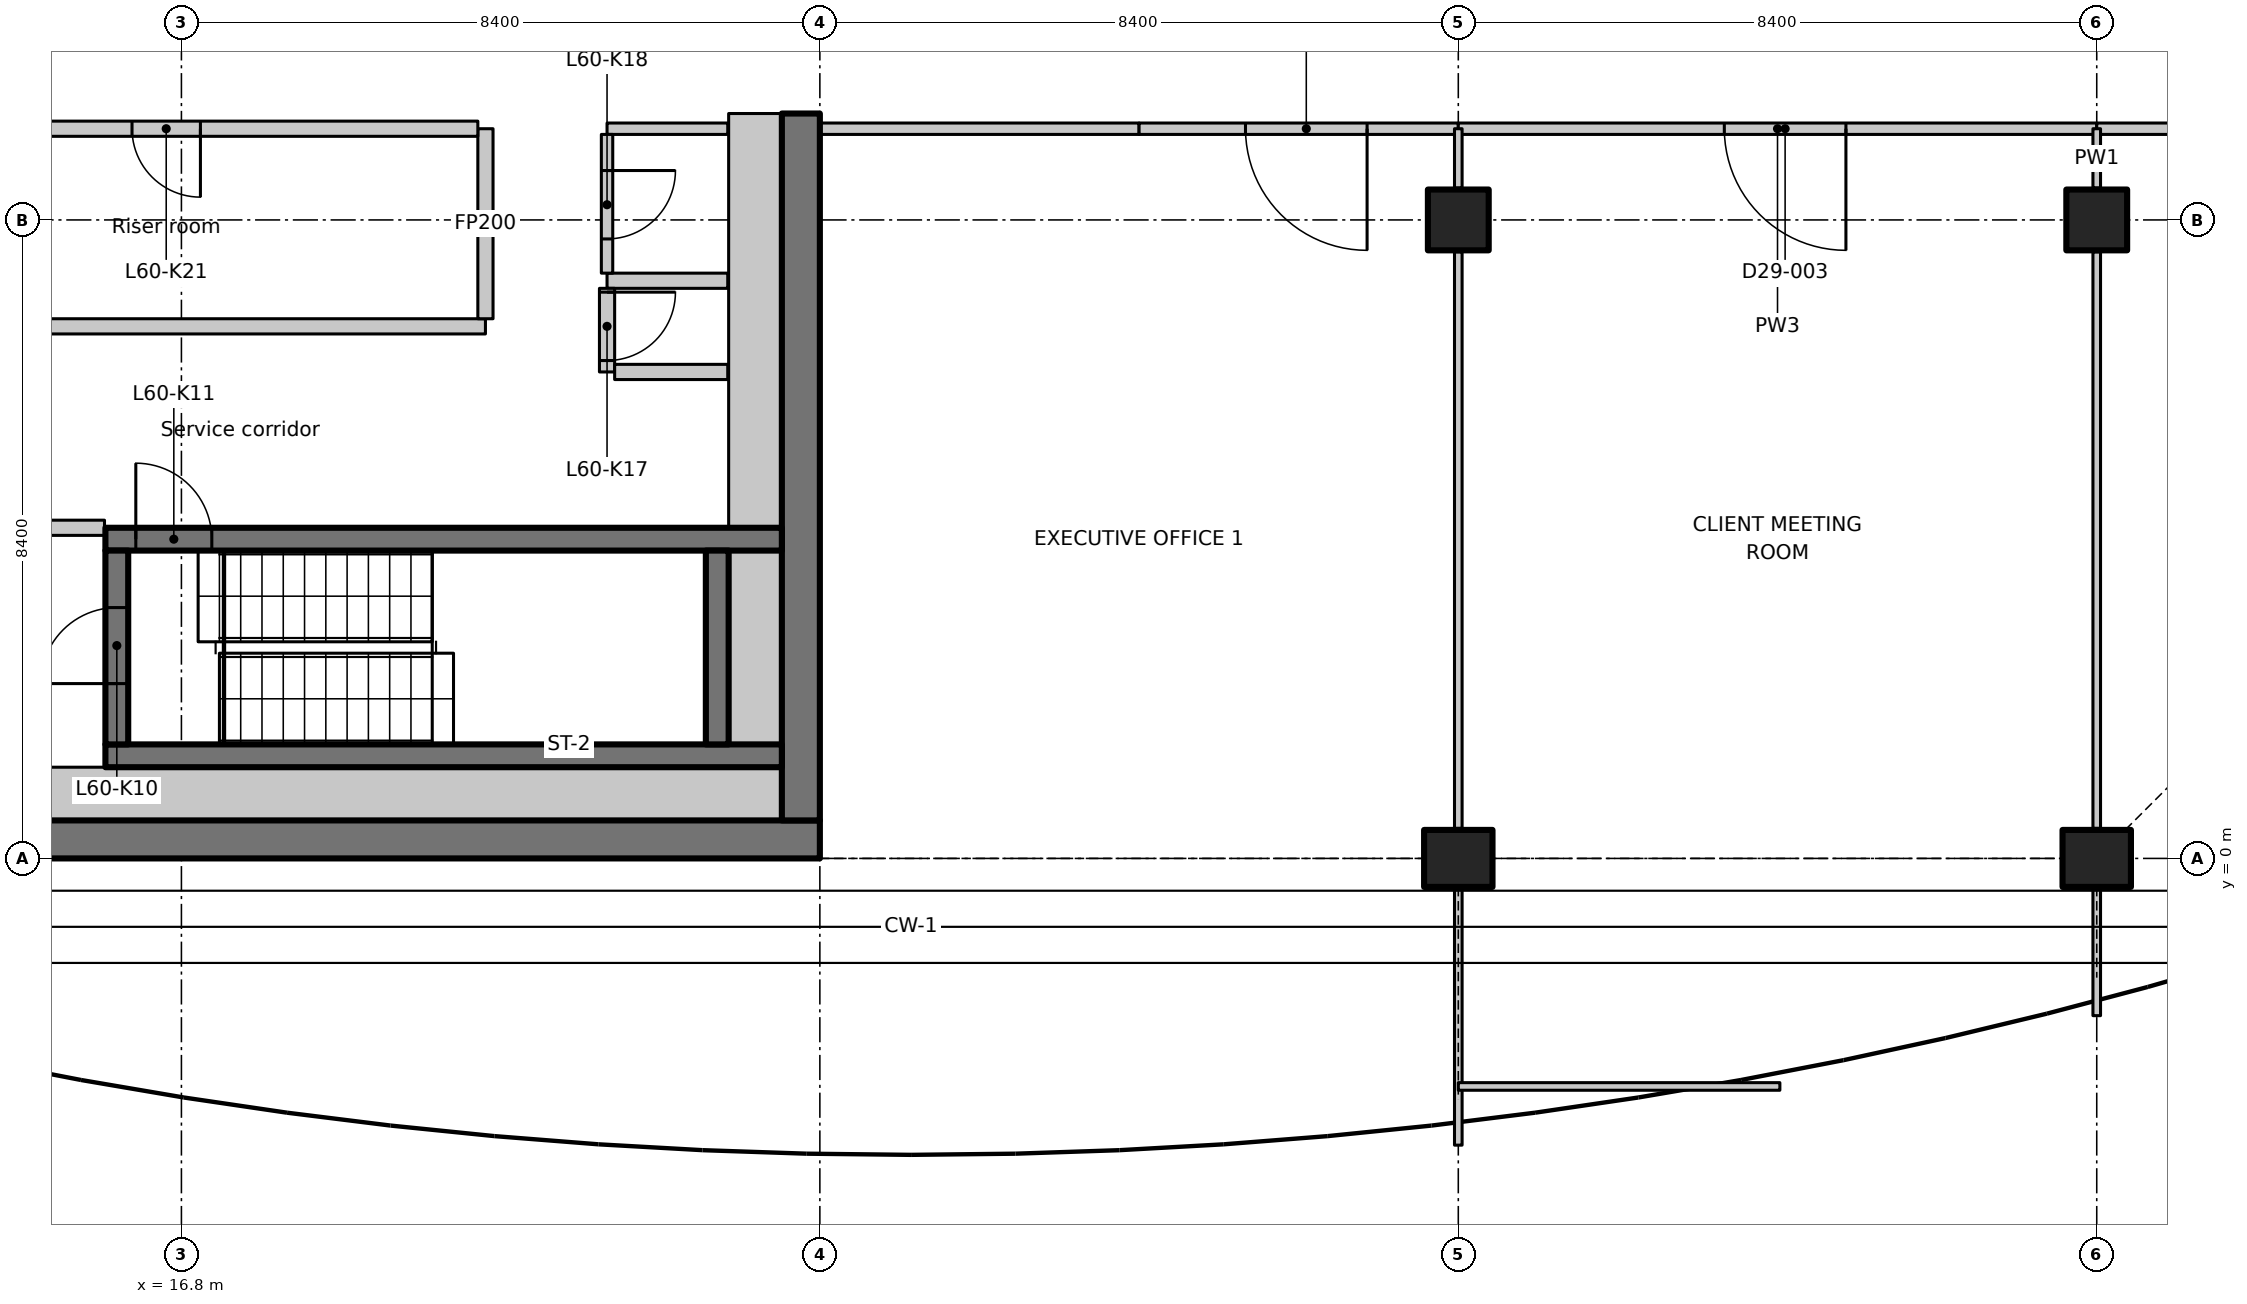
"""IFC4 building model, lengths in metres.
Left out: names, types, materials, properties, quantities, classifications, styles, units other than length and angle.
Written with IfcOpenShell. Run it as: python <this file> out.ifc"""

import sys

from ifc_helpers import new_model, si_unit, direction, frame, frame_2d, origin, origin_2d, place, context, subcontext, project, spatial, polyline, rectangle, outline, extrude, element, fill, save


model = new_model("IFC4")
c1 = context("Model", 3, precision=1e-05, world=origin(), true_north=direction((0.0, 1.0)))
c2 = subcontext(c1, "Body", "Model", "MODEL_VIEW")
j1 = project(units=[si_unit("LENGTHUNIT", "METRE"), si_unit("PLANEANGLEUNIT", "RADIAN")], contexts=[c1])
p1 = place(None, origin())
s1 = spatial("IfcSite", under=j1, at=p1, CompositionType="ELEMENT")
p2 = place(p1, origin())
s2 = spatial("IfcBuilding", under=s1, at=p2, CompositionType="ELEMENT")
p3 = place(p2, frame((0.0, 0.0, 237.3)))
s3 = spatial("IfcBuildingStorey", under=s2, at=p3, CompositionType="ELEMENT", Elevation=237.3)
p4 = place(p3, frame((33.6, 0.0, 0.0), z_axis=(0.0, 0.0, 1.0), x_axis=(0.0, 1.0, 0.0)))
e1 = element("IfcColumn", 1, at=p4, inside=s3, PredefinedType="COLUMN", context=c2, shape_type="SweptSolid", body=[
    extrude(rectangle(XDim=0.75, YDim=0.9, at=origin_2d()), origin(), (0.0, 0.0, 1.0), 3.35),
])
p5 = place(p3, frame((33.6, 8.4, 0.0), z_axis=(0.0, 0.0, 1.0), x_axis=(1.0, 0.0, 0.0)))
e2 = element("IfcColumn", 2, at=p5, inside=s3, PredefinedType="COLUMN", context=c2, shape_type="SweptSolid", body=[
    extrude(rectangle(XDim=0.8, YDim=0.8, at=origin_2d()), origin(), (0.0, 0.0, 1.0), 3.35),
])
p6 = place(p3, frame((42.0, 0.0, 0.0), z_axis=(0.0, 0.0, 1.0), x_axis=(0.0, 1.0, 0.0)))
e3 = element("IfcColumn", 3, at=p6, inside=s3, PredefinedType="COLUMN", context=c2, shape_type="SweptSolid", body=[
    extrude(rectangle(XDim=0.75, YDim=0.9, at=origin_2d()), origin(), (0.0, 0.0, 1.0), 3.35),
])
p7 = place(p3, frame((42.0, 8.4, 0.0), z_axis=(0.0, 0.0, 1.0), x_axis=(1.0, 0.0, 0.0)))
e4 = element("IfcColumn", 4, at=p7, inside=s3, PredefinedType="COLUMN", context=c2, shape_type="SweptSolid", body=[
    extrude(rectangle(XDim=0.8, YDim=0.8, at=origin_2d()), origin(), (0.0, 0.0, 1.0), 3.35),
])
p8 = place(p3, frame((7.436, 0.25, 0.0), z_axis=(0.0, 0.0, 1.0), x_axis=(1.0, 0.0, 0.0)))
e5 = element("IfcWall", 5, at=p8, inside=s3, PredefinedType="SHEAR", context=c2, shape_type="SweptSolid", body=[
    extrude(rectangle(XDim=17.764, YDim=0.5, at=frame_2d((8.882, 0.0))), origin(), (0.0, 0.0, 1.0), 3.35),
])
p9 = place(p3, frame((24.95, 0.5, 0.0), z_axis=(0.0, 0.0, 1.0), x_axis=(0.0, 1.0, 0.0)))
e6 = element("IfcWall", 6, at=p9, inside=s3, PredefinedType="SHEAR", context=c2, shape_type="SweptSolid", body=[
    extrude(rectangle(XDim=9.3, YDim=0.5, at=frame_2d((4.65, 0.0))), origin(), (0.0, 0.0, 1.0), 3.35),
])
p10 = place(p3, frame((15.8, 1.35, 0.0), z_axis=(0.0, 0.0, 1.0), x_axis=(1.0, 0.0, 0.0)))
e7 = element("IfcWall", 7, at=p10, inside=s3, PredefinedType="SHEAR", context=c2, shape_type="SweptSolid", body=[
    extrude(rectangle(XDim=8.9, YDim=0.3, at=frame_2d((4.45, 0.0))), origin(), (0.0, 0.0, 1.0), 3.35),
])
p11 = place(p3, frame((15.8, 4.2, 0.0), z_axis=(0.0, 0.0, 1.0), x_axis=(1.0, 0.0, 0.0)))
e8 = element("IfcWall", 8, at=p11, inside=s3, PredefinedType="SHEAR", context=c2, shape_type="SweptSolid", body=[
    extrude(rectangle(XDim=8.9, YDim=0.3, at=frame_2d((4.45, 0.0))), origin(), (0.0, 0.0, 1.0), 3.35),
])
p12 = place(p11, frame((0.4, 0.0, 0.0)))
e9 = element("IfcOpeningElement", 9, at=p12, cuts=e8, PredefinedType="OPENING", context=c2, shape_type="SweptSolid", body=[
    extrude(rectangle(XDim=1.0, YDim=2.1, at=frame_2d((0.5, 1.05))), frame((0.0, 0.16, 0.0), z_axis=(0.0, -1.0, 0.0), x_axis=(1.0, 0.0, 0.0)), (0.0, 0.0, 1.0), 0.32),
])
p13 = place(p3, frame((15.95, 1.5, 0.0), z_axis=(0.0, 0.0, 1.0), x_axis=(0.0, 1.0, 0.0)))
e10 = element("IfcWall", 10, at=p13, inside=s3, PredefinedType="SHEAR", context=c2, shape_type="SweptSolid", body=[
    extrude(rectangle(XDim=2.55, YDim=0.3, at=frame_2d((1.275, 0.0))), origin(), (0.0, 0.0, 1.0), 3.35),
])
p14 = place(p13, frame((0.8, 0.0, 0.0)))
e11 = element("IfcOpeningElement", 11, at=p14, cuts=e10, PredefinedType="OPENING", context=c2, shape_type="SweptSolid", body=[
    extrude(rectangle(XDim=1.0, YDim=2.1, at=frame_2d((0.5, 1.05))), frame((0.0, 0.16, 0.0), z_axis=(0.0, -1.0, 0.0), x_axis=(1.0, 0.0, 0.0)), (0.0, 0.0, 1.0), 0.32),
])
p15 = place(p3, frame((23.85, 1.5, 0.0), z_axis=(0.0, 0.0, 1.0), x_axis=(0.0, 1.0, 0.0)))
e12 = element("IfcWall", 12, at=p15, inside=s3, PredefinedType="SHEAR", context=c2, shape_type="SweptSolid", body=[
    extrude(rectangle(XDim=2.55, YDim=0.3, at=frame_2d((1.275, 0.0))), origin(), (0.0, 0.0, 1.0), 3.35),
])
p16 = place(p3, frame((13.362, 4.35, 0.0), z_axis=(0.0, 0.0, 1.0), x_axis=(1.0, 0.0, 0.0)))
e13 = element("IfcWall", 13, at=p16, inside=s3, PredefinedType="PARTITIONING", context=c2, shape_type="SweptSolid", body=[
    extrude(rectangle(XDim=2.426, YDim=0.2, at=frame_2d((1.213, 0.0))), origin(), (0.0, 0.0, 1.0), 3.35),
])
p17 = place(p16, frame((0.638, 0.0, 0.0)))
e14 = element("IfcOpeningElement", 14, at=p17, cuts=e13, PredefinedType="OPENING", context=c2, shape_type="SweptSolid", body=[
    extrude(rectangle(XDim=1.0, YDim=2.1, at=frame_2d((0.5, 1.05))), frame((0.0, 0.11, 0.0), z_axis=(0.0, -1.0, 0.0), x_axis=(1.0, 0.0, 0.0)), (0.0, 0.0, 1.0), 0.22),
])
p18 = place(p3, frame((12.4, 7.0, 0.0), z_axis=(0.0, 0.0, 1.0), x_axis=(1.0, 0.0, 0.0)))
e15 = element("IfcWall", 15, at=p18, inside=s3, PredefinedType="PARTITIONING", context=c2, shape_type="SweptSolid", body=[
    extrude(rectangle(XDim=8.4, YDim=0.2, at=frame_2d((4.2, 0.0))), origin(), (0.0, 0.0, 1.0), 3.35),
])
p19 = place(p3, frame((20.8, 7.1, 0.0), z_axis=(0.0, 0.0, 1.0), x_axis=(0.0, 1.0, 0.0)))
e16 = element("IfcWall", 16, at=p19, inside=s3, PredefinedType="PARTITIONING", context=c2, shape_type="SweptSolid", body=[
    extrude(rectangle(XDim=2.5, YDim=0.2, at=frame_2d((1.25, 0.0))), origin(), (0.0, 0.0, 1.0), 3.35),
])
p20 = place(p3, frame((20.7, 9.6, 0.0), z_axis=(0.0, 0.0, 1.0), x_axis=(-1.0, 0.0, 0.0)))
e17 = element("IfcWall", 17, at=p20, inside=s3, PredefinedType="PARTITIONING", context=c2, shape_type="SweptSolid", body=[
    extrude(rectangle(XDim=8.3, YDim=0.2, at=frame_2d((4.15, 0.0))), origin(), (0.0, 0.0, 1.0), 3.35),
])
p21 = place(p20, frame((3.65, 0.0, 0.0)))
e18 = element("IfcOpeningElement", 18, at=p21, cuts=e17, PredefinedType="OPENING", context=c2, shape_type="SweptSolid", body=[
    extrude(rectangle(XDim=0.9, YDim=2.1, at=frame_2d((0.45, 1.05))), frame((0.0, 0.11, 0.0), z_axis=(0.0, -1.0, 0.0), x_axis=(1.0, 0.0, 0.0)), (0.0, 0.0, 1.0), 0.22),
])
p22 = place(p3, frame((23.988, 7.6, 0.0), z_axis=(0.0, 0.0, 1.0), x_axis=(-1.0, 0.0, 0.0)))
e19 = element("IfcWall", 19, at=p22, inside=s3, PredefinedType="PARTITIONING", context=c2, shape_type="SweptSolid", body=[
    extrude(rectangle(XDim=1.588, YDim=0.2, at=frame_2d((0.794, 0.0))), origin(), (0.0, 0.0, 1.0), 3.35),
])
p23 = place(p3, frame((22.4, 7.5, 0.0), z_axis=(0.0, 0.0, 1.0), x_axis=(0.0, -1.0, 0.0)))
e20 = element("IfcWall", 20, at=p23, inside=s3, PredefinedType="PARTITIONING", context=c2, shape_type="SweptSolid", body=[
    extrude(rectangle(XDim=1.1, YDim=0.2, at=frame_2d((0.55, 0.0))), origin(), (0.0, 0.0, 1.0), 3.35),
])
p24 = place(p23, frame((0.05, 0.0, 0.0)))
e21 = element("IfcOpeningElement", 21, at=p24, cuts=e20, PredefinedType="OPENING", context=c2, shape_type="SweptSolid", body=[
    extrude(rectangle(XDim=0.9, YDim=2.1, at=frame_2d((0.45, 1.05))), frame((0.0, 0.11, 0.0), z_axis=(0.0, -1.0, 0.0), x_axis=(1.0, 0.0, 0.0)), (0.0, 0.0, 1.0), 0.22),
])
p25 = place(p3, frame((22.5, 6.4, 0.0), z_axis=(0.0, 0.0, 1.0), x_axis=(1.0, 0.0, 0.0)))
e22 = element("IfcWall", 22, at=p25, inside=s3, PredefinedType="PARTITIONING", context=c2, shape_type="SweptSolid", body=[
    extrude(rectangle(XDim=1.488, YDim=0.2, at=frame_2d((0.744, 0.0))), origin(), (0.0, 0.0, 1.0), 3.35),
])
p26 = place(p3, frame((23.988, 9.6, 0.0), z_axis=(0.0, 0.0, 1.0), x_axis=(-1.0, 0.0, 0.0)))
e23 = element("IfcWall", 23, at=p26, inside=s3, PredefinedType="PARTITIONING", context=c2, shape_type="SweptSolid", body=[
    extrude(rectangle(XDim=1.588, YDim=0.15, at=frame_2d((0.794, 0.0))), origin(), (0.0, 0.0, 1.0), 3.35),
])
p27 = place(p3, frame((22.4, 9.525, 0.0), z_axis=(0.0, 0.0, 1.0), x_axis=(0.0, -1.0, 0.0)))
e24 = element("IfcWall", 24, at=p27, inside=s3, PredefinedType="PARTITIONING", context=c2, shape_type="SweptSolid", body=[
    extrude(rectangle(XDim=1.825, YDim=0.15, at=frame_2d((0.913, 0.0))), origin(), (0.0, 0.0, 1.0), 3.35),
])
p28 = place(p27, frame((0.475, 0.0, 0.0)))
e25 = element("IfcOpeningElement", 25, at=p28, cuts=e24, PredefinedType="OPENING", context=c2, shape_type="SweptSolid", body=[
    extrude(rectangle(XDim=0.9, YDim=2.1, at=frame_2d((0.45, 1.05))), frame((0.0, 0.085, 0.0), z_axis=(0.0, -1.0, 0.0), x_axis=(1.0, 0.0, 0.0)), (0.0, 0.0, 1.0), 0.17),
])
p29 = place(p3, frame((13.35, 0.85, 0.0), z_axis=(0.0, 0.0, 1.0), x_axis=(1.0, 0.0, 0.0)))
e26 = element("IfcWall", 26, at=p29, inside=s3, PredefinedType="PARTITIONING", context=c2, shape_type="SweptSolid", body=[
    extrude(rectangle(XDim=11.35, YDim=0.7, at=frame_2d((5.675, 0.0))), origin(), (0.0, 0.0, 1.0), 3.35),
])
p30 = place(p3, frame((24.35, 1.5, 0.0), z_axis=(0.0, 0.0, 1.0), x_axis=(0.0, 1.0, 0.0)))
e27 = element("IfcWall", 27, at=p30, inside=s3, PredefinedType="PARTITIONING", context=c2, shape_type="SweptSolid", body=[
    extrude(rectangle(XDim=2.55, YDim=0.7, at=frame_2d((1.275, 0.0))), origin(), (0.0, 0.0, 1.0), 3.35),
])
p31 = place(p3, frame((24.35, 4.35, 0.0), z_axis=(0.0, 0.0, 1.0), x_axis=(0.0, 1.0, 0.0)))
e28 = element("IfcWall", 28, at=p31, inside=s3, PredefinedType="PARTITIONING", context=c2, shape_type="SweptSolid", body=[
    extrude(rectangle(XDim=5.45, YDim=0.7, at=frame_2d((2.725, 0.0))), origin(), (0.0, 0.0, 1.0), 3.35),
])
p32 = place(p3, frame((29.4, 9.6, 0.0), z_axis=(0.0, 0.0, 1.0), x_axis=(-1.0, 0.0, 0.0)))
e29 = element("IfcWall", 29, at=p32, inside=s3, PredefinedType="PARTITIONING", context=c2, shape_type="SweptSolid", body=[
    extrude(rectangle(XDim=4.2, YDim=0.15, at=frame_2d((2.1, 0.0))), origin(), (0.0, 0.0, 1.0), 3.33),
])
p33 = place(p3, frame((33.6, 9.6, 0.0), z_axis=(0.0, 0.0, 1.0), x_axis=(-1.0, 0.0, 0.0)))
e30 = element("IfcWall", 30, at=p33, inside=s3, PredefinedType="PARTITIONING", context=c2, shape_type="SweptSolid", body=[
    extrude(rectangle(XDim=4.2, YDim=0.15, at=frame_2d((2.1, 0.0))), origin(), (0.0, 0.0, 1.0), 3.33),
])
p34 = place(p33, frame((1.2, 0.0, 0.0)))
e31 = element("IfcOpeningElement", 31, at=p34, cuts=e30, PredefinedType="OPENING", context=c2, shape_type="SweptSolid", body=[
    extrude(rectangle(XDim=1.6, YDim=2.1, at=frame_2d((0.8, 1.05))), frame((0.0, 0.085, 0.0), z_axis=(0.0, -1.0, 0.0), x_axis=(1.0, 0.0, 0.0)), (0.0, 0.0, 1.0), 0.17),
])
p35 = place(p3, frame((42.0, 9.6, 0.0), z_axis=(0.0, 0.0, 1.0), x_axis=(-1.0, 0.0, 0.0)))
e32 = element("IfcWall", 32, at=p35, inside=s3, PredefinedType="PARTITIONING", context=c2, shape_type="SweptSolid", body=[
    extrude(rectangle(XDim=8.4, YDim=0.15, at=frame_2d((4.2, 0.0))), origin(), (0.0, 0.0, 1.0), 3.33),
])
p36 = place(p35, frame((3.3, 0.0, 0.0)))
e33 = element("IfcOpeningElement", 33, at=p36, cuts=e32, PredefinedType="OPENING", context=c2, shape_type="SweptSolid", body=[
    extrude(rectangle(XDim=1.6, YDim=2.1, at=frame_2d((0.8, 1.05))), frame((0.0, 0.085, 0.0), z_axis=(0.0, -1.0, 0.0), x_axis=(1.0, 0.0, 0.0)), (0.0, 0.0, 1.0), 0.17),
])
p37 = place(p3, frame((51.73, 9.6, 0.0), z_axis=(0.0, 0.0, 1.0), x_axis=(-1.0, 0.0, 0.0)))
e34 = element("IfcWall", 34, at=p37, inside=s3, PredefinedType="PARTITIONING", context=c2, shape_type="SweptSolid", body=[
    extrude(outline(polyline([(0.0, 0.0), (9.73, 0.0), (9.73, 3.33), (1.781, 3.33), (1.779, 2.98), (0.883, 2.98), (0.881, 3.33), (0.25, 3.33), (0.0, 3.33), (0.0, 0.0)])), frame((0.0, 0.075, 0.0), z_axis=(0.0, -1.0, 0.0), x_axis=(1.0, 0.0, 0.0)), (0.0, 0.0, 1.0), 0.15),
])
p38 = place(p37, frame((4.351, 0.0, 0.0)))
e35 = element("IfcOpeningElement", 35, at=p38, cuts=e34, PredefinedType="OPENING", context=c2, shape_type="SweptSolid", body=[
    extrude(rectangle(XDim=1.6, YDim=2.1, at=frame_2d((0.8, 1.05))), frame((0.0, 0.085, 0.0), z_axis=(0.0, -1.0, 0.0), x_axis=(1.0, 0.0, 0.0)), (0.0, 0.0, 1.0), 0.17),
])
p39 = place(p3, frame((33.6, 9.6, 0.0), z_axis=(0.0, 0.0, 1.0), x_axis=(0.0, -1.0, 0.0)))
e36 = element("IfcWall", 36, at=p39, inside=s3, PredefinedType="PARTITIONING", context=c2, shape_type="SweptSolid", body=[
    extrude(rectangle(XDim=0.78, YDim=0.1, at=frame_2d((0.39, 0.0))), origin(), (0.0, 0.0, 1.0), 3.33),
])
p40 = place(p3, frame((33.6, 7.98, 0.0), z_axis=(0.0, 0.0, 1.0), x_axis=(0.0, -1.0, 0.0)))
e37 = element("IfcWall", 37, at=p40, inside=s3, PredefinedType="PARTITIONING", context=c2, shape_type="SweptSolid", body=[
    extrude(outline(polyline([(0.0, 0.0), (7.585, 0.0), (7.585, 2.98), (7.532, 2.98), (7.53, 3.33), (0.0, 3.33), (0.0, 0.0)])), frame((0.0, 0.05, 0.0), z_axis=(0.0, -1.0, 0.0), x_axis=(1.0, 0.0, 0.0)), (0.0, 0.0, 1.0), 0.1),
])
p41 = place(p3, frame((33.6, -0.395, 0.0), z_axis=(0.0, 0.0, 1.0), x_axis=(0.0, -1.0, 0.0)))
e38 = element("IfcWall", 38, at=p41, inside=s3, PredefinedType="PARTITIONING", context=c2, shape_type="SweptSolid", body=[
    extrude(rectangle(XDim=3.377, YDim=0.1, at=frame_2d((1.688, 0.0))), origin(), (0.0, 0.0, 1.0), 2.98),
])
p42 = place(p3, frame((33.6, -3.0, 0.0), z_axis=(0.0, 0.0, 1.0), x_axis=(1.0, 0.0, 0.0)))
e39 = element("IfcWall", 39, at=p42, inside=s3, PredefinedType="PARTITIONING", context=c2, shape_type="SweptSolid", body=[
    extrude(rectangle(XDim=4.231, YDim=0.1, at=frame_2d((2.115, 0.0))), origin(), (0.0, 0.0, 1.0), 2.98),
])
p43 = place(p3, frame((42.0, 9.6, 0.0), z_axis=(0.0, 0.0, 1.0), x_axis=(0.0, -1.0, 0.0)))
e40 = element("IfcWall", 40, at=p43, inside=s3, PredefinedType="PARTITIONING", context=c2, shape_type="SweptSolid", body=[
    extrude(rectangle(XDim=0.78, YDim=0.1, at=frame_2d((0.39, 0.0))), origin(), (0.0, 0.0, 1.0), 3.33),
])
p44 = place(p3, frame((42.0, 7.98, 0.0), z_axis=(0.0, 0.0, 1.0), x_axis=(0.0, -1.0, 0.0)))
e41 = element("IfcWall", 41, at=p44, inside=s3, PredefinedType="PARTITIONING", context=c2, shape_type="SweptSolid", body=[
    extrude(outline(polyline([(0.0, 0.0), (7.585, 0.0), (7.585, 2.98), (7.316, 2.98), (7.314, 3.33), (0.0, 3.33), (0.0, 0.0)])), frame((0.0, 0.05, 0.0), z_axis=(0.0, -1.0, 0.0), x_axis=(1.0, 0.0, 0.0)), (0.0, 0.0, 1.0), 0.1),
])
p45 = place(p3, frame((42.0, -0.395, 0.0), z_axis=(0.0, 0.0, 1.0), x_axis=(0.0, -1.0, 0.0)))
e42 = element("IfcWall", 42, at=p45, inside=s3, PredefinedType="PARTITIONING", context=c2, shape_type="SweptSolid", body=[
    extrude(rectangle(XDim=1.674, YDim=0.1, at=frame_2d((0.837, 0.0))), origin(), (0.0, 0.0, 1.0), 2.98),
])
p46 = place(p14, origin())
e43 = element("IfcDoor", 43, at=p46, inside=s3, OperationType="SINGLE_SWING_LEFT", PredefinedType="DOOR", context=c2, shape_type="SweptSolid", body=[
    extrude(rectangle(XDim=1.0, YDim=2.1, at=frame_2d((0.5, 1.05))), frame((0.0, 0.025, 0.0), z_axis=(0.0, -1.0, 0.0), x_axis=(1.0, 0.0, 0.0)), (0.0, 0.0, 1.0), 0.05),
])
fill(e11, e43)
p47 = place(p12, origin())
e44 = element("IfcDoor", 44, at=p47, inside=s3, OperationType="SINGLE_SWING_RIGHT", PredefinedType="DOOR", context=c2, shape_type="SweptSolid", body=[
    extrude(rectangle(XDim=1.0, YDim=2.1, at=frame_2d((0.5, 1.05))), frame((0.0, 0.025, 0.0), z_axis=(0.0, -1.0, 0.0), x_axis=(1.0, 0.0, 0.0)), (0.0, 0.0, 1.0), 0.05),
])
fill(e9, e44)
p48 = place(p24, origin())
e45 = element("IfcDoor", 45, at=p48, inside=s3, OperationType="SINGLE_SWING_RIGHT", PredefinedType="DOOR", context=c2, shape_type="SweptSolid", body=[
    extrude(rectangle(XDim=0.9, YDim=2.1, at=frame_2d((0.45, 1.05))), frame((0.0, 0.025, 0.0), z_axis=(0.0, -1.0, 0.0), x_axis=(1.0, 0.0, 0.0)), (0.0, 0.0, 1.0), 0.05),
])
fill(e21, e45)
p49 = place(p28, origin())
e46 = element("IfcDoor", 46, at=p49, inside=s3, OperationType="SINGLE_SWING_LEFT", PredefinedType="DOOR", context=c2, shape_type="SweptSolid", body=[
    extrude(rectangle(XDim=0.9, YDim=2.1, at=frame_2d((0.45, 1.05))), frame((0.0, 0.025, 0.0), z_axis=(0.0, -1.0, 0.0), x_axis=(1.0, 0.0, 0.0)), (0.0, 0.0, 1.0), 0.05),
])
fill(e25, e46)
p50 = place(p21, origin())
e47 = element("IfcDoor", 47, at=p50, inside=s3, OperationType="SINGLE_SWING_RIGHT", PredefinedType="DOOR", context=c2, shape_type="SweptSolid", body=[
    extrude(rectangle(XDim=0.9, YDim=2.1, at=frame_2d((0.45, 1.05))), frame((0.0, 0.025, 0.0), z_axis=(0.0, -1.0, 0.0), x_axis=(1.0, 0.0, 0.0)), (0.0, 0.0, 1.0), 0.05),
])
fill(e18, e47)
p51 = place(p34, origin())
e48 = element("IfcDoor", 48, at=p51, inside=s3, OperationType="DOUBLE_DOOR_SINGLE_SWING", PredefinedType="DOOR", context=c2, shape_type="SweptSolid", body=[
    extrude(rectangle(XDim=1.6, YDim=2.1, at=frame_2d((0.8, 1.05))), frame((0.0, 0.025, 0.0), z_axis=(0.0, -1.0, 0.0), x_axis=(1.0, 0.0, 0.0)), (0.0, 0.0, 1.0), 0.05),
])
fill(e31, e48)
p52 = place(p36, origin())
e49 = element("IfcDoor", 49, at=p52, inside=s3, OperationType="DOUBLE_DOOR_SINGLE_SWING", PredefinedType="DOOR", context=c2, shape_type="SweptSolid", body=[
    extrude(rectangle(XDim=1.6, YDim=2.1, at=frame_2d((0.8, 1.05))), frame((0.0, 0.025, 0.0), z_axis=(0.0, -1.0, 0.0), x_axis=(1.0, 0.0, 0.0)), (0.0, 0.0, 1.0), 0.05),
])
fill(e33, e49)
save(model, sys.argv[1])
